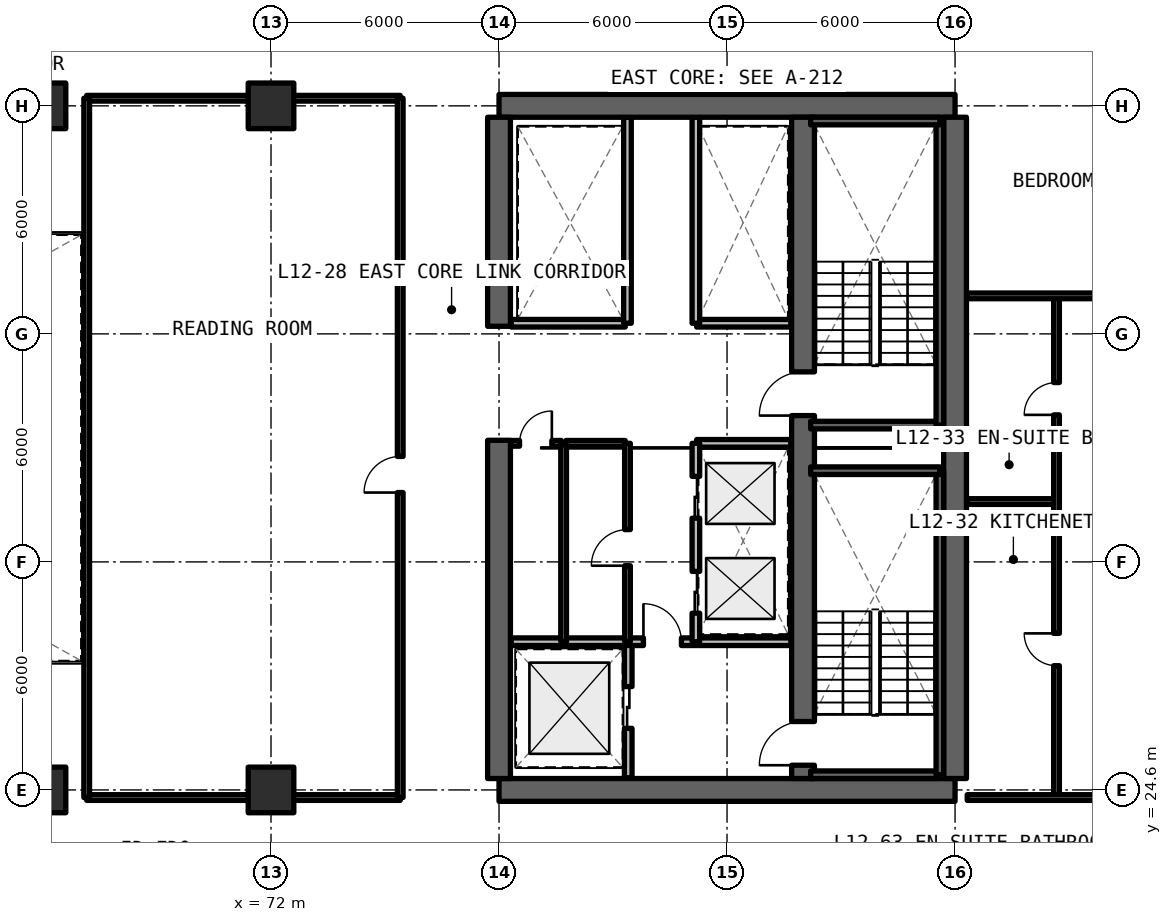
"""IFC4 building model, lengths in metres.
Left out: names, types, materials, properties, quantities, classifications, styles, units other than length and angle.
Written with IfcOpenShell. Run it as: python <this file> out.ifc"""

import sys

from ifc_helpers import new_model, si_unit, direction, frame, frame_2d, origin, origin_2d, place, context, subcontext, project, spatial, rectangle, extrude, element, fill, save


model = new_model("IFC4")
c1 = context("Model", 3, precision=1e-05, world=origin(), true_north=direction((0.0, 1.0)))
c2 = subcontext(c1, "Body", "Model", "MODEL_VIEW")
j1 = project(units=[si_unit("LENGTHUNIT", "METRE"), si_unit("PLANEANGLEUNIT", "RADIAN")], contexts=[c1])
p1 = place(None, origin())
s1 = spatial("IfcSite", under=j1, at=p1, CompositionType="ELEMENT")
p2 = place(p1, origin())
s2 = spatial("IfcBuilding", under=s1, at=p2, CompositionType="ELEMENT")
p3 = place(p2, frame((0.0, 0.0, 45.54)))
s3 = spatial("IfcBuildingStorey", under=s2, at=p3, CompositionType="ELEMENT", Elevation=45.54)
for number, where, z_axis, x_axis in (
    (1, (78.0, 24.6, 0.0), (0.0, 0.0, 1.0), (1.0, 0.0, 0.0)),
    (2, (90.0, 42.6, 0.0), (0.0, 0.0, 1.0), (-1.0, 0.0, 0.0)),
):
    element("IfcWall", number, at=place(p3, frame(where, z_axis=z_axis, x_axis=x_axis)), inside=s3, PredefinedType="SHEAR", context=c2, shape_type="SweptSolid", body=[
        extrude(rectangle(XDim=12.0, YDim=0.6, at=frame_2d((6.0, 0.0))), origin(), (0.0, 0.0, 1.0), 3.3),
    ])
p4 = place(p3, frame((90.0, 24.9, 0.0), z_axis=(0.0, 0.0, 1.0), x_axis=(0.0, 1.0, 0.0)))
e3 = element("IfcWall", 3, at=p4, inside=s3, PredefinedType="SHEAR", context=c2, shape_type="SweptSolid", body=[
    extrude(rectangle(XDim=17.4, YDim=0.6, at=frame_2d((8.7, 0.0))), origin(), (0.0, 0.0, 1.0), 3.3),
])
p5 = place(p3, frame((78.0, 24.9, 0.0), z_axis=(0.0, 0.0, 1.0), x_axis=(0.0, 1.0, 0.0)))
e4 = element("IfcWall", 4, at=p5, inside=s3, PredefinedType="SHEAR", context=c2, shape_type="SweptSolid", body=[
    extrude(rectangle(XDim=8.9, YDim=0.6, at=frame_2d((4.45, 0.0))), origin(), (0.0, 0.0, 1.0), 3.3),
])
p6 = place(p3, frame((78.0, 36.8, 0.0), z_axis=(0.0, 0.0, 1.0), x_axis=(0.0, 1.0, 0.0)))
e5 = element("IfcWall", 5, at=p6, inside=s3, PredefinedType="SHEAR", context=c2, shape_type="SweptSolid", body=[
    extrude(rectangle(XDim=5.5, YDim=0.6, at=frame_2d((2.75, 0.0))), origin(), (0.0, 0.0, 1.0), 3.3),
])
p7 = place(p3, frame((86.0, 24.9, 0.0), z_axis=(0.0, 0.0, 1.0), x_axis=(0.0, 1.0, 0.0)))
e6 = element("IfcWall", 6, at=p7, inside=s3, PredefinedType="SHEAR", context=c2, shape_type="SweptSolid", body=[
    extrude(rectangle(XDim=17.4, YDim=0.6, at=frame_2d((8.7, 0.0))), origin(), (0.0, 0.0, 1.0), 3.3),
])
p8 = place(p7, frame((0.35, 0.0, 0.0)))
e7 = element("IfcOpeningElement", 7, at=p8, cuts=e6, PredefinedType="OPENING", context=c2, shape_type="SweptSolid", body=[
    extrude(rectangle(XDim=1.15, YDim=2.15, at=frame_2d((0.575, 1.075))), frame((0.0, 0.31, 0.0), z_axis=(0.0, -1.0, 0.0), x_axis=(1.0, 0.0, 0.0)), (0.0, 0.0, 1.0), 0.62),
])
p9 = place(p7, frame((9.55, 0.0, 0.0)))
e8 = element("IfcOpeningElement", 8, at=p9, cuts=e6, PredefinedType="OPENING", context=c2, shape_type="SweptSolid", body=[
    extrude(rectangle(XDim=1.15, YDim=2.15, at=frame_2d((0.575, 1.075))), frame((0.0, 0.31, 0.0), z_axis=(0.0, -1.0, 0.0), x_axis=(1.0, 0.0, 0.0)), (0.0, 0.0, 1.0), 0.62),
])
for number, where, z_axis, x_axis in (
    (9, (66.0, 24.6, 0.0), (0.0, 0.0, 1.0), (1.0, 0.0, 0.0)),
    (10, (66.0, 42.6, 0.0), (0.0, 0.0, 1.0), (1.0, 0.0, 0.0)),
    (11, (72.0, 24.6, 0.0), (0.0, 0.0, 1.0), (1.0, 0.0, 0.0)),
    (12, (72.0, 42.6, 0.0), (0.0, 0.0, 1.0), (1.0, 0.0, 0.0)),
):
    element("IfcColumn", number, at=place(p3, frame(where, z_axis=z_axis, x_axis=x_axis)), inside=s3, PredefinedType="COLUMN", context=c2, shape_type="SweptSolid", body=[
        extrude(rectangle(XDim=1.2, YDim=1.2, at=origin_2d()), origin(), (0.0, 0.0, 1.0), 3.3),
    ])
p10 = place(p3, frame((81.4, 24.92, 0.0), z_axis=(0.0, 0.0, 1.0), x_axis=(0.0, 1.0, 0.0)))
e13 = element("IfcWall", 13, at=p10, inside=s3, PredefinedType="SOLIDWALL", context=c2, shape_type="SweptSolid", body=[
    extrude(rectangle(XDim=3.58, YDim=0.2, at=frame_2d((1.79, 0.0))), origin(), (0.0, 0.0, 1.0), 2.35),
])
p11 = place(p10, frame((1.3, 0.0, 0.0)))
e14 = element("IfcOpeningElement", 14, at=p11, cuts=e13, PredefinedType="OPENING", context=c2, shape_type="SweptSolid", body=[
    extrude(rectangle(XDim=1.1, YDim=2.2, at=frame_2d((0.55, 1.1))), frame((0.0, 0.11, 0.0), z_axis=(0.0, -1.0, 0.0), x_axis=(1.0, 0.0, 0.0)), (0.0, 0.0, 1.0), 0.22),
])
p12 = place(p3, frame((78.32, 28.5, 0.0), z_axis=(0.0, 0.0, 1.0), x_axis=(1.0, 0.0, 0.0)))
e15 = element("IfcWall", 15, at=p12, inside=s3, PredefinedType="SOLIDWALL", context=c2, shape_type="SweptSolid", body=[
    extrude(rectangle(XDim=7.36, YDim=0.2, at=frame_2d((3.68, 0.0))), origin(), (0.0, 0.0, 1.0), 2.35),
])
p13 = place(p12, frame((3.48, 0.0, 0.0)))
e16 = element("IfcOpeningElement", 16, at=p13, cuts=e15, PredefinedType="OPENING", context=c2, shape_type="SweptSolid", body=[
    extrude(rectangle(XDim=1.0, YDim=2.15, at=frame_2d((0.5, 1.075))), frame((0.0, 0.11, 0.0), z_axis=(0.0, -1.0, 0.0), x_axis=(1.0, 0.0, 0.0)), (0.0, 0.0, 1.0), 0.22),
])
p14 = place(p3, frame((83.2, 33.72, 0.0), z_axis=(0.0, 0.0, 1.0), x_axis=(1.0, 0.0, 0.0)))
e17 = element("IfcWall", 17, at=p14, inside=s3, PredefinedType="SOLIDWALL", context=c2, shape_type="SweptSolid", body=[
    extrude(rectangle(XDim=2.48, YDim=0.2, at=frame_2d((1.24, 0.0))), origin(), (0.0, 0.0, 1.0), 2.35),
])
p15 = place(p3, frame((83.18, 28.5, 0.0), z_axis=(0.0, 0.0, 1.0), x_axis=(0.0, 1.0, 0.0)))
e18 = element("IfcWall", 18, at=p15, inside=s3, PredefinedType="SOLIDWALL", context=c2, shape_type="SweptSolid", body=[
    extrude(rectangle(XDim=5.22, YDim=0.2, at=frame_2d((2.61, 0.0))), origin(), (0.0, 0.0, 1.0), 2.35),
])
p16 = place(p15, frame((0.75, 0.0, 0.0)))
e19 = element("IfcOpeningElement", 19, at=p16, cuts=e18, PredefinedType="OPENING", context=c2, shape_type="SweptSolid", body=[
    extrude(rectangle(XDim=1.1, YDim=2.2, at=frame_2d((0.55, 1.1))), frame((0.0, 0.11, 0.0), z_axis=(0.0, -1.0, 0.0), x_axis=(1.0, 0.0, 0.0)), (0.0, 0.0, 1.0), 0.22),
])
p17 = place(p15, frame((3.25, 0.0, 0.0)))
e20 = element("IfcOpeningElement", 20, at=p17, cuts=e18, PredefinedType="OPENING", context=c2, shape_type="SweptSolid", body=[
    extrude(rectangle(XDim=1.1, YDim=2.2, at=frame_2d((0.55, 1.1))), frame((0.0, 0.11, 0.0), z_axis=(0.0, -1.0, 0.0), x_axis=(1.0, 0.0, 0.0)), (0.0, 0.0, 1.0), 0.22),
])
p18 = place(p3, frame((79.7, 28.5, 0.0), z_axis=(0.0, 0.0, 1.0), x_axis=(0.0, 1.0, 0.0)))
e21 = element("IfcWall", 21, at=p18, inside=s3, PredefinedType="SOLIDWALL", context=c2, shape_type="SweptSolid", body=[
    extrude(rectangle(XDim=5.22, YDim=0.15, at=frame_2d((2.61, 0.0))), origin(), (0.0, 0.0, 1.0), 2.35),
])
p19 = place(p3, frame((79.76, 33.72, 0.0), z_axis=(0.0, 0.0, 1.0), x_axis=(1.0, 0.0, 0.0)))
e22 = element("IfcWall", 22, at=p19, inside=s3, PredefinedType="SOLIDWALL", context=c2, shape_type="SweptSolid", body=[
    extrude(rectangle(XDim=1.56, YDim=0.15, at=frame_2d((0.78, 0.0))), origin(), (0.0, 0.0, 1.0), 2.35),
])
p20 = place(p3, frame((78.32, 33.72, 0.0), z_axis=(0.0, 0.0, 1.0), x_axis=(1.0, 0.0, 0.0)))
e23 = element("IfcWall", 23, at=p20, inside=s3, PredefinedType="SOLIDWALL", context=c2, shape_type="SweptSolid", body=[
    extrude(rectangle(XDim=1.32, YDim=0.15, at=frame_2d((0.66, 0.0))), origin(), (0.0, 0.0, 1.0), 2.35),
])
p21 = place(p20, frame((0.22, 0.0, 0.0)))
e24 = element("IfcOpeningElement", 24, at=p21, cuts=e23, PredefinedType="OPENING", context=c2, shape_type="SweptSolid", body=[
    extrude(rectangle(XDim=0.85, YDim=2.1, at=frame_2d((0.425, 1.05))), frame((0.0, 0.085, 0.0), z_axis=(0.0, -1.0, 0.0), x_axis=(1.0, 0.0, 0.0)), (0.0, 0.0, 1.0), 0.17),
])
p22 = place(p3, frame((81.38, 28.5, 0.0), z_axis=(0.0, 0.0, 1.0), x_axis=(0.0, 1.0, 0.0)))
e25 = element("IfcWall", 25, at=p22, inside=s3, PredefinedType="SOLIDWALL", context=c2, shape_type="SweptSolid", body=[
    extrude(rectangle(XDim=5.22, YDim=0.15, at=frame_2d((2.61, 0.0))), origin(), (0.0, 0.0, 1.0), 2.35),
])
p23 = place(p22, frame((2.0, 0.0, 0.0)))
e26 = element("IfcOpeningElement", 26, at=p23, cuts=e25, PredefinedType="OPENING", context=c2, shape_type="SweptSolid", body=[
    extrude(rectangle(XDim=0.95, YDim=2.15, at=frame_2d((0.475, 1.075))), frame((0.0, 0.085, 0.0), z_axis=(0.0, -1.0, 0.0), x_axis=(1.0, 0.0, 0.0)), (0.0, 0.0, 1.0), 0.17),
])
p24 = place(p3, frame((83.2, 36.88, 0.0), z_axis=(0.0, 0.0, 1.0), x_axis=(1.0, 0.0, 0.0)))
e27 = element("IfcWall", 27, at=p24, inside=s3, PredefinedType="SOLIDWALL", context=c2, shape_type="SweptSolid", body=[
    extrude(rectangle(XDim=2.48, YDim=0.2, at=frame_2d((1.24, 0.0))), origin(), (0.0, 0.0, 1.0), 2.35),
])
p25 = place(p3, frame((83.18, 36.88, 0.0), z_axis=(0.0, 0.0, 1.0), x_axis=(0.0, 1.0, 0.0)))
e28 = element("IfcWall", 28, at=p25, inside=s3, PredefinedType="SOLIDWALL", context=c2, shape_type="SweptSolid", body=[
    extrude(rectangle(XDim=5.42, YDim=0.2, at=frame_2d((2.71, 0.0))), origin(), (0.0, 0.0, 1.0), 2.35),
])
p26 = place(p3, frame((78.32, 36.88, 0.0), z_axis=(0.0, 0.0, 1.0), x_axis=(1.0, 0.0, 0.0)))
e29 = element("IfcWall", 29, at=p26, inside=s3, PredefinedType="SOLIDWALL", context=c2, shape_type="SweptSolid", body=[
    extrude(rectangle(XDim=3.0, YDim=0.2, at=frame_2d((1.5, 0.0))), origin(), (0.0, 0.0, 1.0), 2.35),
])
p27 = place(p3, frame((81.38, 36.88, 0.0), z_axis=(0.0, 0.0, 1.0), x_axis=(0.0, 1.0, 0.0)))
e30 = element("IfcWall", 30, at=p27, inside=s3, PredefinedType="SOLIDWALL", context=c2, shape_type="SweptSolid", body=[
    extrude(rectangle(XDim=5.42, YDim=0.2, at=frame_2d((2.71, 0.0))), origin(), (0.0, 0.0, 1.0), 2.35),
])
for number, where, z_axis, x_axis in (
    (31, (67.15, 24.4, 0.0), (0.0, 0.0, 1.0), (1.0, 0.0, 0.0)),
    (32, (67.15, 42.8, 0.0), (0.0, 0.0, 1.0), (1.0, 0.0, 0.0)),
):
    element("IfcWall", number, at=place(p3, frame(where, z_axis=z_axis, x_axis=x_axis)), inside=s3, PredefinedType="SOLIDWALL", context=c2, shape_type="SweptSolid", body=[
        extrude(rectangle(XDim=8.25, YDim=0.15, at=frame_2d((4.125, 0.0))), origin(), (0.0, 0.0, 1.0), 2.295),
    ])
p28 = place(p3, frame((67.15, 24.4, 0.0), z_axis=(0.0, 0.0, 1.0), x_axis=(0.0, 1.0, 0.0)))
e33 = element("IfcWall", 33, at=p28, inside=s3, PredefinedType="SOLIDWALL", context=c2, shape_type="SweptSolid", body=[
    extrude(rectangle(XDim=18.4, YDim=0.15, at=frame_2d((9.2, 0.0))), origin(), (0.0, 0.0, 1.0), 2.35),
])
p29 = place(p3, frame((75.4, 24.4, 0.0), z_axis=(0.0, 0.0, 1.0), x_axis=(0.0, 1.0, 0.0)))
e34 = element("IfcWall", 34, at=p29, inside=s3, PredefinedType="SOLIDWALL", context=c2, shape_type="SweptSolid", body=[
    extrude(rectangle(XDim=18.4, YDim=0.15, at=frame_2d((9.2, 0.0))), origin(), (0.0, 0.0, 1.0), 2.35),
])
p30 = place(p29, frame((8.025, 0.0, 0.0)))
e35 = element("IfcOpeningElement", 35, at=p30, cuts=e34, PredefinedType="OPENING", context=c2, shape_type="SweptSolid", body=[
    extrude(rectangle(XDim=0.95, YDim=2.15, at=frame_2d((0.475, 1.075))), frame((0.0, 0.085, 0.0), z_axis=(0.0, -1.0, 0.0), x_axis=(1.0, 0.0, 0.0)), (0.0, 0.0, 1.0), 0.17),
])
p31 = place(p3, frame((90.32, 32.188, 0.0), z_axis=(0.0, 0.0, 1.0), x_axis=(1.0, 0.0, 0.0)))
e36 = element("IfcWall", 36, at=p31, inside=s3, PredefinedType="PARTITIONING", context=c2, shape_type="SweptSolid", body=[
    extrude(rectangle(XDim=2.35, YDim=0.15, at=frame_2d((1.175, 0.0))), origin(), (0.0, 0.0, 1.0), 2.35),
])
p32 = place(p3, frame((92.67, 24.4, 0.0), z_axis=(0.0, 0.0, 1.0), x_axis=(0.0, 1.0, 0.0)))
e37 = element("IfcWall", 37, at=p32, inside=s3, PredefinedType="PARTITIONING", context=c2, shape_type="SweptSolid", body=[
    extrude(rectangle(XDim=13.2, YDim=0.15, at=frame_2d((6.6, 0.0))), origin(), (0.0, 0.0, 1.0), 2.35),
])
p33 = place(p32, frame((3.469, 0.0, 0.0)))
e38 = element("IfcOpeningElement", 38, at=p33, cuts=e37, PredefinedType="OPENING", context=c2, shape_type="SweptSolid", body=[
    extrude(rectangle(XDim=0.85, YDim=2.1, at=frame_2d((0.425, 1.05))), frame((0.0, 0.085, 0.0), z_axis=(0.0, -1.0, 0.0), x_axis=(1.0, 0.0, 0.0)), (0.0, 0.0, 1.0), 0.17),
])
p34 = place(p32, frame((10.069, 0.0, 0.0)))
e39 = element("IfcOpeningElement", 39, at=p34, cuts=e37, PredefinedType="OPENING", context=c2, shape_type="SweptSolid", body=[
    extrude(rectangle(XDim=0.85, YDim=2.1, at=frame_2d((0.425, 1.05))), frame((0.0, 0.085, 0.0), z_axis=(0.0, -1.0, 0.0), x_axis=(1.0, 0.0, 0.0)), (0.0, 0.0, 1.0), 0.17),
])
p35 = place(p3, frame((90.32, 37.6, 0.0), z_axis=(0.0, 0.0, 1.0), x_axis=(1.0, 0.0, 0.0)))
e40 = element("IfcWall", 40, at=p35, inside=s3, PredefinedType="PARTITIONING", context=c2, shape_type="SweptSolid", body=[
    extrude(rectangle(XDim=10.24, YDim=0.15, at=frame_2d((5.12, 0.0))), origin(), (0.0, 0.0, 1.0), 2.35),
])
p36 = place(p35, frame((3.412, 0.0, 0.0)))
e41 = element("IfcOpeningElement", 41, at=p36, cuts=e40, PredefinedType="OPENING", context=c2, shape_type="SweptSolid", body=[
    extrude(rectangle(XDim=0.85, YDim=2.1, at=frame_2d((0.425, 1.05))), frame((0.0, 0.085, 0.0), z_axis=(0.0, -1.0, 0.0), x_axis=(1.0, 0.0, 0.0)), (0.0, 0.0, 1.0), 0.17),
])
p37 = place(p35, frame((7.357, 0.0, 0.0)))
e42 = element("IfcOpeningElement", 42, at=p37, cuts=e40, PredefinedType="OPENING", context=c2, shape_type="SweptSolid", body=[
    extrude(rectangle(XDim=0.85, YDim=2.1, at=frame_2d((0.425, 1.05))), frame((0.0, 0.085, 0.0), z_axis=(0.0, -1.0, 0.0), x_axis=(1.0, 0.0, 0.0)), (0.0, 0.0, 1.0), 0.17),
])
p38 = place(p3, frame((90.32, 24.4, 0.0), z_axis=(0.0, 0.0, 1.0), x_axis=(1.0, 0.0, 0.0)))
e43 = element("IfcWall", 43, at=p38, inside=s3, PredefinedType="SOLIDWALL", context=c2, shape_type="SweptSolid", body=[
    extrude(rectangle(XDim=10.24, YDim=0.15, at=frame_2d((5.12, 0.0))), origin(), (0.0, 0.0, 1.0), 2.295),
])
p39 = place(p38, frame((3.913, 0.0, 0.0)))
e44 = element("IfcOpeningElement", 44, at=p39, cuts=e43, PredefinedType="OPENING", context=c2, shape_type="SweptSolid", body=[
    extrude(rectangle(XDim=0.95, YDim=2.15, at=frame_2d((0.475, 1.075))), frame((0.0, 0.085, 0.0), z_axis=(0.0, -1.0, 0.0), x_axis=(1.0, 0.0, 0.0)), (0.0, 0.0, 1.0), 0.17),
])
p40 = place(p3, frame((86.2, 25.0, 0.0), z_axis=(0.0, 0.0, 1.0), x_axis=(1.0, 0.0, 0.0)))
e45 = element("IfcWall", 45, at=p40, inside=s3, PredefinedType="SOLIDWALL", context=c2, shape_type="SweptSolid", body=[
    extrude(rectangle(XDim=3.4, YDim=0.2, at=frame_2d((1.7, 0.0))), origin(), (0.0, 0.0, 1.0), 3.3),
])
p41 = place(p3, frame((89.6, 25.0, 0.0), z_axis=(0.0, 0.0, 1.0), x_axis=(0.0, 1.0, 0.0)))
e46 = element("IfcWall", 46, at=p41, inside=s3, PredefinedType="SOLIDWALL", context=c2, shape_type="SweptSolid", body=[
    extrude(rectangle(XDim=8.0, YDim=0.2, at=frame_2d((4.0, 0.0))), origin(), (0.0, 0.0, 1.0), 3.3),
])
for number, where, z_axis, x_axis in (
    (47, (89.6, 33.0, 0.0), (0.0, 0.0, 1.0), (-1.0, 0.0, 0.0)),
    (48, (86.2, 34.2, 0.0), (0.0, 0.0, 1.0), (1.0, 0.0, 0.0)),
):
    element("IfcWall", number, at=place(p3, frame(where, z_axis=z_axis, x_axis=x_axis)), inside=s3, PredefinedType="SOLIDWALL", context=c2, shape_type="SweptSolid", body=[
        extrude(rectangle(XDim=3.4, YDim=0.2, at=frame_2d((1.7, 0.0))), origin(), (0.0, 0.0, 1.0), 3.3),
    ])
p42 = place(p3, frame((89.6, 34.2, 0.0), z_axis=(0.0, 0.0, 1.0), x_axis=(0.0, 1.0, 0.0)))
e49 = element("IfcWall", 49, at=p42, inside=s3, PredefinedType="SOLIDWALL", context=c2, shape_type="SweptSolid", body=[
    extrude(rectangle(XDim=8.0, YDim=0.2, at=frame_2d((4.0, 0.0))), origin(), (0.0, 0.0, 1.0), 3.3),
])
p43 = place(p3, frame((89.6, 42.2, 0.0), z_axis=(0.0, 0.0, 1.0), x_axis=(-1.0, 0.0, 0.0)))
e50 = element("IfcWall", 50, at=p43, inside=s3, PredefinedType="SOLIDWALL", context=c2, shape_type="SweptSolid", body=[
    extrude(rectangle(XDim=3.4, YDim=0.2, at=frame_2d((1.7, 0.0))), origin(), (0.0, 0.0, 1.0), 3.3),
])
p44 = place(p11, origin())
e51 = element("IfcDoor", 51, at=p44, inside=s3, OperationType="SLIDING_TO_LEFT", PredefinedType="DOOR", context=c2, shape_type="SweptSolid", body=[
    extrude(rectangle(XDim=1.1, YDim=2.2, at=frame_2d((0.55, 1.1))), frame((0.0, 0.025, 0.0), z_axis=(0.0, -1.0, 0.0), x_axis=(1.0, 0.0, 0.0)), (0.0, 0.0, 1.0), 0.05),
])
fill(e14, e51)
p45 = place(p13, origin())
e52 = element("IfcDoor", 52, at=p45, inside=s3, OperationType="SINGLE_SWING_LEFT", PredefinedType="DOOR", context=c2, shape_type="SweptSolid", body=[
    extrude(rectangle(XDim=1.0, YDim=2.15, at=frame_2d((0.5, 1.075))), frame((0.0, 0.025, 0.0), z_axis=(0.0, -1.0, 0.0), x_axis=(1.0, 0.0, 0.0)), (0.0, 0.0, 1.0), 0.05),
])
fill(e16, e52)
p46 = place(p16, origin())
e53 = element("IfcDoor", 53, at=p46, inside=s3, OperationType="SLIDING_TO_LEFT", PredefinedType="DOOR", context=c2, shape_type="SweptSolid", body=[
    extrude(rectangle(XDim=1.1, YDim=2.2, at=frame_2d((0.55, 1.1))), frame((0.0, 0.025, 0.0), z_axis=(0.0, -1.0, 0.0), x_axis=(1.0, 0.0, 0.0)), (0.0, 0.0, 1.0), 0.05),
])
fill(e19, e53)
p47 = place(p17, origin())
e54 = element("IfcDoor", 54, at=p47, inside=s3, OperationType="SLIDING_TO_RIGHT", PredefinedType="DOOR", context=c2, shape_type="SweptSolid", body=[
    extrude(rectangle(XDim=1.1, YDim=2.2, at=frame_2d((0.55, 1.1))), frame((0.0, 0.025, 0.0), z_axis=(0.0, -1.0, 0.0), x_axis=(1.0, 0.0, 0.0)), (0.0, 0.0, 1.0), 0.05),
])
fill(e20, e54)
p48 = place(p21, origin())
e55 = element("IfcDoor", 55, at=p48, inside=s3, OperationType="SINGLE_SWING_RIGHT", PredefinedType="DOOR", context=c2, shape_type="SweptSolid", body=[
    extrude(rectangle(XDim=0.85, YDim=2.1, at=frame_2d((0.425, 1.05))), frame((0.0, 0.025, 0.0), z_axis=(0.0, -1.0, 0.0), x_axis=(1.0, 0.0, 0.0)), (0.0, 0.0, 1.0), 0.05),
])
fill(e24, e55)
p49 = place(p23, origin())
e56 = element("IfcDoor", 56, at=p49, inside=s3, OperationType="SINGLE_SWING_LEFT", PredefinedType="DOOR", context=c2, shape_type="SweptSolid", body=[
    extrude(rectangle(XDim=0.95, YDim=2.15, at=frame_2d((0.475, 1.075))), frame((0.0, 0.025, 0.0), z_axis=(0.0, -1.0, 0.0), x_axis=(1.0, 0.0, 0.0)), (0.0, 0.0, 1.0), 0.05),
])
fill(e26, e56)
p50 = place(p30, origin())
e57 = element("IfcDoor", 57, at=p50, inside=s3, OperationType="SINGLE_SWING_LEFT", PredefinedType="DOOR", context=c2, shape_type="SweptSolid", body=[
    extrude(rectangle(XDim=0.95, YDim=2.15, at=frame_2d((0.475, 1.075))), frame((0.0, 0.025, 0.0), z_axis=(0.0, -1.0, 0.0), x_axis=(1.0, 0.0, 0.0)), (0.0, 0.0, 1.0), 0.05),
])
fill(e35, e57)
p51 = place(p33, origin())
e58 = element("IfcDoor", 58, at=p51, inside=s3, OperationType="SINGLE_SWING_RIGHT", PredefinedType="DOOR", context=c2, shape_type="SweptSolid", body=[
    extrude(rectangle(XDim=0.85, YDim=2.1, at=frame_2d((0.425, 1.05))), frame((0.0, 0.025, 0.0), z_axis=(0.0, -1.0, 0.0), x_axis=(1.0, 0.0, 0.0)), (0.0, 0.0, 1.0), 0.05),
])
fill(e38, e58)
p52 = place(p34, origin())
e59 = element("IfcDoor", 59, at=p52, inside=s3, OperationType="SINGLE_SWING_LEFT", PredefinedType="DOOR", context=c2, shape_type="SweptSolid", body=[
    extrude(rectangle(XDim=0.85, YDim=2.1, at=frame_2d((0.425, 1.05))), frame((0.0, 0.025, 0.0), z_axis=(0.0, -1.0, 0.0), x_axis=(1.0, 0.0, 0.0)), (0.0, 0.0, 1.0), 0.05),
])
fill(e39, e59)
p53 = place(p8, origin())
e60 = element("IfcDoor", 60, at=p53, inside=s3, OperationType="SINGLE_SWING_LEFT", PredefinedType="DOOR", context=c2, shape_type="SweptSolid", body=[
    extrude(rectangle(XDim=1.15, YDim=2.15, at=frame_2d((0.575, 1.075))), frame((0.0, 0.025, 0.0), z_axis=(0.0, -1.0, 0.0), x_axis=(1.0, 0.0, 0.0)), (0.0, 0.0, 1.0), 0.05),
])
fill(e7, e60)
p54 = place(p9, origin())
e61 = element("IfcDoor", 61, at=p54, inside=s3, OperationType="SINGLE_SWING_RIGHT", PredefinedType="DOOR", context=c2, shape_type="SweptSolid", body=[
    extrude(rectangle(XDim=1.15, YDim=2.15, at=frame_2d((0.575, 1.075))), frame((0.0, 0.025, 0.0), z_axis=(0.0, -1.0, 0.0), x_axis=(1.0, 0.0, 0.0)), (0.0, 0.0, 1.0), 0.05),
])
fill(e8, e61)
save(model, sys.argv[1])
